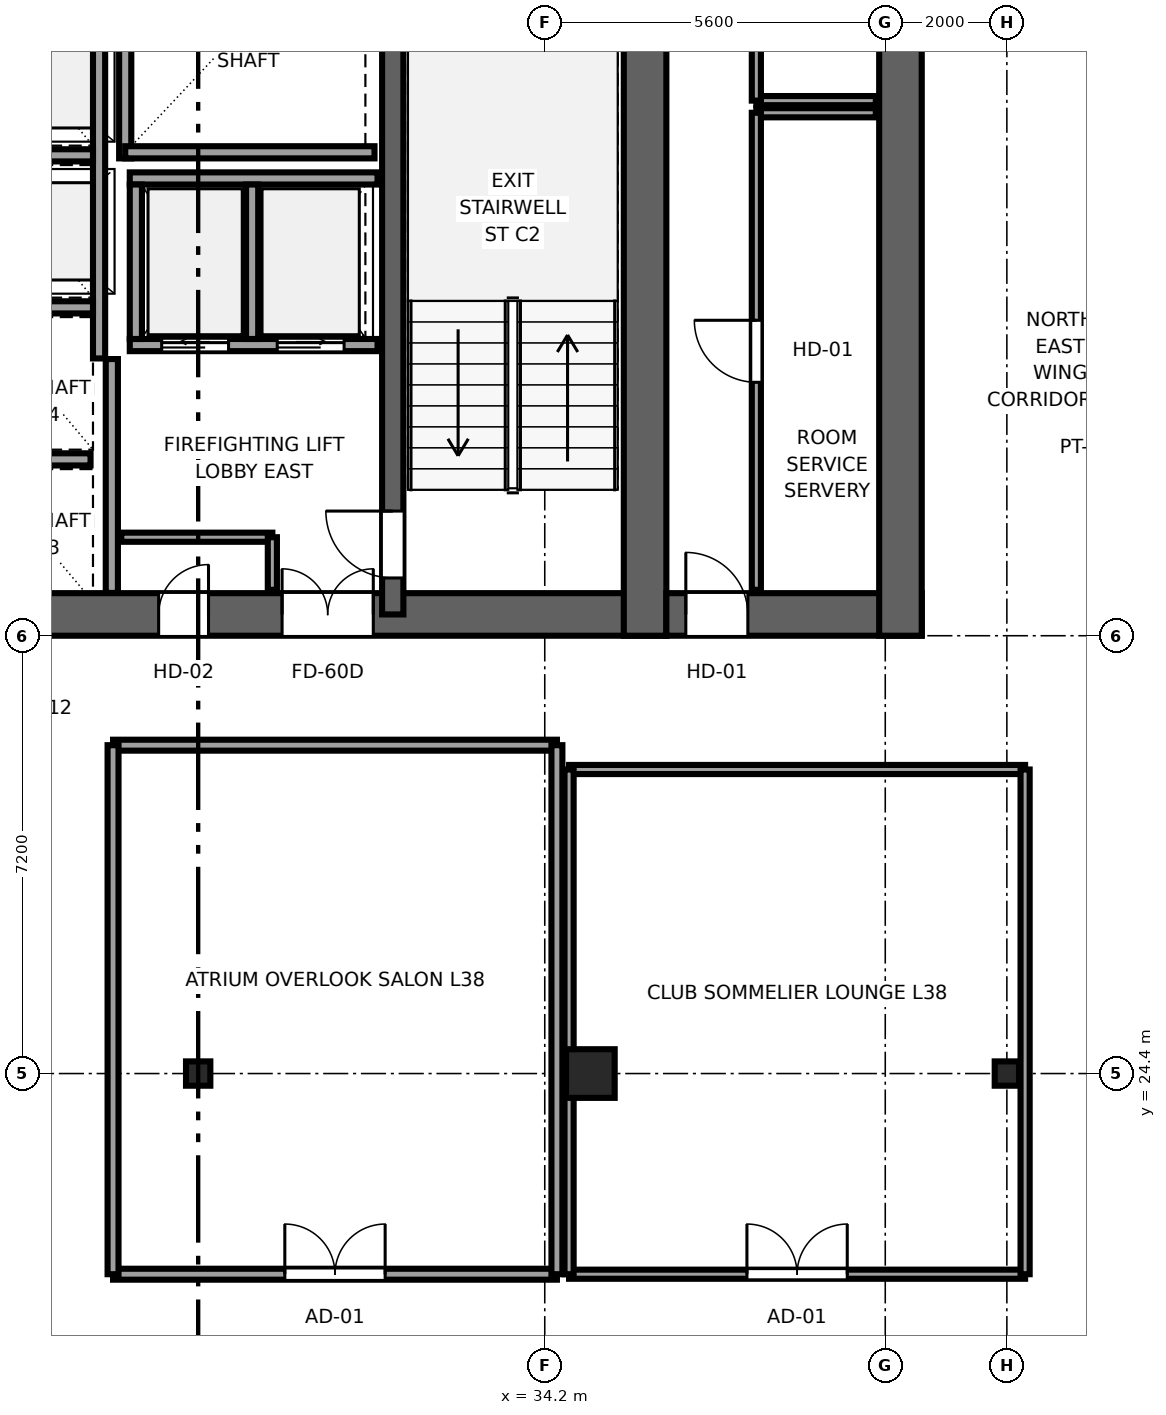
"""IFC4 building model, lengths in metres.
Left out: names, types, materials, properties, quantities, classifications, styles, units other than length and angle.
Written with IfcOpenShell. Run it as: python <this file> out.ifc"""

import sys

from ifc_helpers import new_model, si_unit, direction, frame, frame_2d, origin, origin_2d, place, context, subcontext, project, spatial, rectangle, i_section, extrude, source, transform, mapped, element, fill, save


model = new_model("IFC4")
c1 = context("Model", 3, precision=1e-05, world=origin(), true_north=direction((0.0, 1.0)))
c2 = subcontext(c1, "Body", "Model", "MODEL_VIEW")
j1 = project(units=[si_unit("LENGTHUNIT", "METRE"), si_unit("PLANEANGLEUNIT", "RADIAN")], contexts=[c1])
p1 = place(None, origin())
s1 = spatial("IfcSite", under=j1, at=p1, CompositionType="ELEMENT")
p2 = place(p1, origin())
s2 = spatial("IfcBuilding", under=s1, at=p2, CompositionType="ELEMENT")
p3 = place(p2, frame((0.0, 0.0, 147.05)))
s3 = spatial("IfcBuildingStorey", under=s2, at=p3, CompositionType="ELEMENT", Elevation=147.05)
p4 = place(p3, frame((9.8, 31.95, 0.0), z_axis=(0.0, 0.0, 1.0), x_axis=(1.0, 0.0, 0.0)))
e1 = element("IfcWall", 1, at=p4, inside=s3, PredefinedType="SHEAR", context=c2, shape_type="SweptSolid", body=[
    extrude(rectangle(XDim=26.4, YDim=0.7, at=frame_2d((13.2, 0.0))), origin(), (0.0, 0.0, 1.0), 3.55),
])
p5 = place(p4, frame((6.32, 0.0, 0.0), z_axis=(0.0, 0.0, 1.0), x_axis=(-1.0, 0.0, 0.0)))
e2 = element("IfcOpeningElement", 2, at=p5, cuts=e1, PredefinedType="OPENING", context=c2, shape_type="SweptSolid", body=[
    extrude(rectangle(XDim=1.5, YDim=2.04, at=frame_2d((0.75, 1.02))), frame((0.0, 0.36, 0.0), z_axis=(0.0, -1.0, 0.0), x_axis=(1.0, 0.0, 0.0)), (0.0, 0.0, 1.0), 0.72),
])
p6 = place(p4, frame((13.95, 0.0, 0.0), z_axis=(0.0, 0.0, 1.0), x_axis=(-1.0, 0.0, 0.0)))
e3 = element("IfcOpeningElement", 3, at=p6, cuts=e1, PredefinedType="OPENING", context=c2, shape_type="SweptSolid", body=[
    extrude(rectangle(XDim=1.5, YDim=2.04, at=frame_2d((0.75, 1.02))), frame((0.0, 0.36, 0.0), z_axis=(0.0, -1.0, 0.0), x_axis=(1.0, 0.0, 0.0)), (0.0, 0.0, 1.0), 0.72),
])
p7 = place(p4, frame((21.58, 0.0, 0.0), z_axis=(0.0, 0.0, 1.0), x_axis=(-1.0, 0.0, 0.0)))
e4 = element("IfcOpeningElement", 4, at=p7, cuts=e1, PredefinedType="OPENING", context=c2, shape_type="SweptSolid", body=[
    extrude(rectangle(XDim=1.5, YDim=2.04, at=frame_2d((0.75, 1.02))), frame((0.0, 0.36, 0.0), z_axis=(0.0, -1.0, 0.0), x_axis=(1.0, 0.0, 0.0)), (0.0, 0.0, 1.0), 0.72),
])
p8 = place(p4, frame((8.37, 0.0, 0.0), z_axis=(0.0, 0.0, 1.0), x_axis=(-1.0, 0.0, 0.0)))
e5 = element("IfcOpeningElement", 5, at=p8, cuts=e1, PredefinedType="OPENING", context=c2, shape_type="SweptSolid", body=[
    extrude(rectangle(XDim=0.82, YDim=2.01, at=frame_2d((0.41, 1.005))), frame((0.0, 0.36, 0.0), z_axis=(0.0, -1.0, 0.0), x_axis=(1.0, 0.0, 0.0)), (0.0, 0.0, 1.0), 0.72),
])
p9 = place(p4, frame((18.87, 0.0, 0.0), z_axis=(0.0, 0.0, 1.0), x_axis=(-1.0, 0.0, 0.0)))
e6 = element("IfcOpeningElement", 6, at=p9, cuts=e1, PredefinedType="OPENING", context=c2, shape_type="SweptSolid", body=[
    extrude(rectangle(XDim=0.82, YDim=2.01, at=frame_2d((0.41, 1.005))), frame((0.0, 0.36, 0.0), z_axis=(0.0, -1.0, 0.0), x_axis=(1.0, 0.0, 0.0)), (0.0, 0.0, 1.0), 0.72),
])
p10 = place(p3, frame((35.85, 31.6, 0.0), z_axis=(0.0, 0.0, 1.0), x_axis=(0.0, 1.0, 0.0)))
e7 = element("IfcWall", 7, at=p10, inside=s3, PredefinedType="SHEAR", context=c2, shape_type="SweptSolid", body=[
    extrude(rectangle(XDim=13.6, YDim=0.7, at=frame_2d((6.8, 0.0))), origin(), (0.0, 0.0, 1.0), 3.55),
])
p11 = place(p3, frame((31.7, 31.95, 0.0), z_axis=(0.0, 0.0, 1.0), x_axis=(0.0, 1.0, 0.0)))
e8 = element("IfcWall", 8, at=p11, inside=s3, PredefinedType="SHEAR", context=c2, shape_type="SweptSolid", body=[
    extrude(rectangle(XDim=12.9, YDim=0.35, at=frame_2d((6.45, 0.0))), origin(), (0.0, 0.0, 1.0), 3.55),
])
p12 = place(p11, frame((1.7, 0.0, 0.0), z_axis=(0.0, 0.0, 1.0), x_axis=(-1.0, 0.0, 0.0)))
e9 = element("IfcOpeningElement", 9, at=p12, cuts=e8, PredefinedType="OPENING", context=c2, shape_type="SweptSolid", body=[
    extrude(rectangle(XDim=1.1, YDim=2.12, at=frame_2d((0.55, 1.06))), frame((0.0, 0.185, 0.0), z_axis=(0.0, -1.0, 0.0), x_axis=(1.0, 0.0, 0.0)), (0.0, 0.0, 1.0), 0.37),
])
p13 = place(p3, frame((36.2, 31.95, 0.0), z_axis=(0.0, 0.0, 1.0), x_axis=(1.0, 0.0, 0.0)))
e10 = element("IfcWall", 10, at=p13, inside=s3, PredefinedType="SHEAR", context=c2, shape_type="SweptSolid", body=[
    extrude(rectangle(XDim=4.2, YDim=0.7, at=frame_2d((2.1, 0.0))), origin(), (0.0, 0.0, 1.0), 3.55),
])
p14 = place(p13, frame((1.34, 0.0, 0.0), z_axis=(0.0, 0.0, 1.0), x_axis=(-1.0, 0.0, 0.0)))
e11 = element("IfcOpeningElement", 11, at=p14, cuts=e10, PredefinedType="OPENING", context=c2, shape_type="SweptSolid", body=[
    extrude(rectangle(XDim=1.02, YDim=2.03, at=frame_2d((0.51, 1.015))), frame((0.0, 0.36, 0.0), z_axis=(0.0, -1.0, 0.0), x_axis=(1.0, 0.0, 0.0)), (0.0, 0.0, 1.0), 0.72),
])
p15 = place(p3, frame((40.05, 31.6, 0.0), z_axis=(0.0, 0.0, 1.0), x_axis=(0.0, 1.0, 0.0)))
e12 = element("IfcWall", 12, at=p15, inside=s3, PredefinedType="SHEAR", context=c2, shape_type="SweptSolid", body=[
    extrude(rectangle(XDim=13.6, YDim=0.7, at=frame_2d((6.8, 0.0))), origin(), (0.0, 0.0, 1.0), 3.55),
])
m1 = source(origin(), c2, "Body", "SweptSolid", [
    extrude(rectangle(XDim=0.8, YDim=0.8, at=origin_2d()), origin(), (0.0, 0.0, 1.0), 3.55),
])
p16 = place(p3, frame((34.95, 24.4, 0.0), z_axis=(0.0, 0.0, 1.0), x_axis=(1.0, 0.0, 0.0)))
e13 = element("IfcColumn", 13, at=p16, inside=s3, PredefinedType="COLUMN", context=c2, shape_type="MappedRepresentation", body=[
    mapped(m1, transform((0.0, 0.0, 0.0), x_axis=(1.0, 0.0, 0.0), y_axis=(0.0, 1.0, 0.0), z_axis=(0.0, 0.0, 1.0), scale=1.0)),
])
m2 = source(origin(), c2, "Body", "SweptSolid", [
    extrude(i_section(OverallWidth=0.4, OverallDepth=0.4, WebThickness=0.02, FlangeThickness=0.035, at=origin_2d()), origin(), (0.0, 0.0, 1.0), 3.55),
])
for number, where, z_axis, x_axis in (
    (14, (41.8, 24.4, 0.0), (0.0, 0.0, 1.0), (1.0, 0.0, 0.0)),
    (15, (28.5, 24.4, 0.0), (0.0, 0.0, 1.0), (1.0, 0.0, 0.0)),
):
    element("IfcColumn", number, at=place(p3, frame(where, z_axis=z_axis, x_axis=x_axis)), inside=s3, PredefinedType="COLUMN", context=c2, shape_type="MappedRepresentation", body=[
        mapped(m2, transform((0.0, 0.0, 0.0), x_axis=(1.0, 0.0, 0.0), y_axis=(0.0, 1.0, 0.0), z_axis=(0.0, 0.0, 1.0), scale=1.0)),
    ])
p17 = place(p3, frame((27.3, 39.45, 0.0), z_axis=(0.0, 0.0, 1.0), x_axis=(0.0, 1.0, 0.0)))
e16 = element("IfcWall", 16, at=p17, inside=s3, PredefinedType="SOLIDWALL", context=c2, shape_type="SweptSolid", body=[
    extrude(rectangle(XDim=4.4, YDim=0.2, at=frame_2d((2.2, 0.0))), origin(), (0.0, 0.0, 1.0), 3.37),
])
p18 = place(p3, frame((27.3, 39.55, 0.0), z_axis=(0.0, 0.0, 1.0), x_axis=(1.0, 0.0, 0.0)))
e17 = element("IfcWall", 17, at=p18, inside=s3, PredefinedType="SOLIDWALL", context=c2, shape_type="SweptSolid", body=[
    extrude(rectangle(XDim=4.1, YDim=0.2, at=frame_2d((2.05, 0.0))), origin(), (0.0, 0.0, 1.0), 3.37),
])
p19 = place(p3, frame((27.08, 32.304, 0.0), z_axis=(0.0, 0.0, 1.0), x_axis=(0.0, 1.0, 0.0)))
e18 = element("IfcWall", 18, at=p19, inside=s3, PredefinedType="SOLIDWALL", context=c2, shape_type="SweptSolid", body=[
    extrude(rectangle(XDim=3.846, YDim=0.2, at=frame_2d((1.923, 0.0))), origin(), (0.0, 0.0, 1.0), 3.37),
])
p20 = place(p3, frame((27.375, 36.38, 0.0), z_axis=(0.0, 0.0, 1.0), x_axis=(1.0, 0.0, 0.0)))
e19 = element("IfcWall", 19, at=p20, inside=s3, PredefinedType="SOLIDWALL", context=c2, shape_type="SweptSolid", body=[
    extrude(rectangle(XDim=4.075, YDim=0.2, at=frame_2d((2.038, 0.0))), origin(), (0.0, 0.0, 1.0), 3.37),
])
p21 = place(p20, frame((0.525, 0.0, 0.0)))
e20 = element("IfcOpeningElement", 20, at=p21, cuts=e19, PredefinedType="OPENING", context=c2, shape_type="SweptSolid", body=[
    extrude(rectangle(XDim=1.1, YDim=2.12, at=frame_2d((0.55, 1.06))), frame((0.0, 0.11, 0.0), z_axis=(0.0, -1.0, 0.0), x_axis=(1.0, 0.0, 0.0)), (0.0, 0.0, 1.0), 0.22),
])
p22 = place(p20, frame((2.425, 0.0, 0.0)))
e21 = element("IfcOpeningElement", 21, at=p22, cuts=e19, PredefinedType="OPENING", context=c2, shape_type="SweptSolid", body=[
    extrude(rectangle(XDim=1.1, YDim=2.12, at=frame_2d((0.55, 1.06))), frame((0.0, 0.11, 0.0), z_axis=(0.0, -1.0, 0.0), x_axis=(1.0, 0.0, 0.0)), (0.0, 0.0, 1.0), 0.22),
])
p23 = place(p3, frame((27.375, 39.12, 0.0), z_axis=(0.0, 0.0, 1.0), x_axis=(1.0, 0.0, 0.0)))
e22 = element("IfcWall", 22, at=p23, inside=s3, PredefinedType="SOLIDWALL", context=c2, shape_type="SweptSolid", body=[
    extrude(rectangle(XDim=4.075, YDim=0.2, at=frame_2d((2.038, 0.0))), origin(), (0.0, 0.0, 1.0), 3.37),
])
for number, where, z_axis, x_axis in (
    (23, (27.475, 36.48, 0.0), (0.0, 0.0, 1.0), (0.0, 1.0, 0.0)),
    (24, (29.387, 36.48, 0.0), (0.0, 0.0, 1.0), (0.0, 1.0, 0.0)),
):
    element("IfcWall", number, at=place(p3, frame(where, z_axis=z_axis, x_axis=x_axis)), inside=s3, PredefinedType="SOLIDWALL", context=c2, shape_type="SweptSolid", body=[
        extrude(rectangle(XDim=2.54, YDim=0.2, at=frame_2d((1.27, 0.0))), origin(), (0.0, 0.0, 1.0), 3.37),
    ])
p24 = place(p3, frame((26.87, 36.16, 0.0), z_axis=(0.0, 0.0, 1.0), x_axis=(0.0, 1.0, 0.0)))
e25 = element("IfcWall", 25, at=p24, inside=s3, PredefinedType="SOLIDWALL", context=c2, shape_type="SweptSolid", body=[
    extrude(rectangle(XDim=8.336, YDim=0.2, at=frame_2d((4.168, 0.0))), origin(), (0.0, 0.0, 1.0), 3.37),
])
p25 = place(p3, frame((24.93, 34.5, 0.0), z_axis=(0.0, 0.0, 1.0), x_axis=(1.0, 0.0, 0.0)))
e26 = element("IfcWall", 26, at=p25, inside=s3, PredefinedType="SOLIDWALL", context=c2, shape_type="SweptSolid", body=[
    extrude(rectangle(XDim=1.8, YDim=0.2, at=frame_2d((0.9, 0.0))), origin(), (0.0, 0.0, 1.0), 3.37),
])
for number, where, z_axis, x_axis in (
    (27, (24.93, 37.0, 0.0), (0.0, 0.0, 1.0), (1.0, 0.0, 0.0)),
    (28, (24.93, 39.5, 0.0), (0.0, 0.0, 1.0), (1.0, 0.0, 0.0)),
):
    element("IfcWall", number, at=place(p3, frame(where, z_axis=z_axis, x_axis=x_axis)), inside=s3, PredefinedType="SOLIDWALL", context=c2, shape_type="SweptSolid", body=[
        extrude(rectangle(XDim=1.84, YDim=0.2, at=frame_2d((0.92, 0.0))), origin(), (0.0, 0.0, 1.0), 3.37),
    ])
p26 = place(p3, frame((27.235, 33.22, 0.0), z_axis=(0.0, 0.0, 1.0), x_axis=(1.0, 0.0, 0.0)))
e29 = element("IfcWall", 29, at=p26, inside=s3, PredefinedType="PARTITIONING", context=c2, shape_type="SweptSolid", body=[
    extrude(rectangle(XDim=2.485, YDim=0.15, at=frame_2d((1.242, 0.0))), origin(), (0.0, 0.0, 1.0), 3.37),
])
p27 = place(p3, frame((29.72, 32.355, 0.0), z_axis=(0.0, 0.0, 1.0), x_axis=(0.0, 1.0, 0.0)))
e30 = element("IfcWall", 30, at=p27, inside=s3, PredefinedType="PARTITIONING", context=c2, shape_type="SweptSolid", body=[
    extrude(rectangle(XDim=0.865, YDim=0.15, at=frame_2d((0.433, 0.0))), origin(), (0.0, 0.0, 1.0), 3.37),
])
p28 = place(p3, frame((37.68, 40.2, 0.0), z_axis=(0.0, 0.0, 1.0), x_axis=(1.0, 0.0, 0.0)))
e31 = element("IfcWall", 31, at=p28, inside=s3, PredefinedType="PARTITIONING", context=c2, shape_type="SweptSolid", body=[
    extrude(rectangle(XDim=1.965, YDim=0.15, at=frame_2d((0.982, 0.0))), origin(), (0.0, 0.0, 1.0), 3.37),
])
p29 = place(p3, frame((37.68, 32.355, 0.0), z_axis=(0.0, 0.0, 1.0), x_axis=(0.0, 1.0, 0.0)))
e32 = element("IfcWall", 32, at=p29, inside=s3, PredefinedType="PARTITIONING", context=c2, shape_type="SweptSolid", body=[
    extrude(rectangle(XDim=7.845, YDim=0.15, at=frame_2d((3.922, 0.0))), origin(), (0.0, 0.0, 1.0), 3.37),
])
p30 = place(p29, frame((3.413, 0.0, 0.0)))
e33 = element("IfcOpeningElement", 33, at=p30, cuts=e32, PredefinedType="OPENING", context=c2, shape_type="SweptSolid", body=[
    extrude(rectangle(XDim=1.02, YDim=2.03, at=frame_2d((0.51, 1.015))), frame((0.0, 0.085, 0.0), z_axis=(0.0, -1.0, 0.0), x_axis=(1.0, 0.0, 0.0)), (0.0, 0.0, 1.0), 0.17),
])
p31 = place(p3, frame((37.68, 40.4, 0.0), z_axis=(0.0, 0.0, 1.0), x_axis=(1.0, 0.0, 0.0)))
e34 = element("IfcWall", 34, at=p31, inside=s3, PredefinedType="PARTITIONING", context=c2, shape_type="SweptSolid", body=[
    extrude(rectangle(XDim=1.965, YDim=0.15, at=frame_2d((0.982, 0.0))), origin(), (0.0, 0.0, 1.0), 3.37),
])
p32 = place(p3, frame((37.68, 40.4, 0.0), z_axis=(0.0, 0.0, 1.0), x_axis=(0.0, 1.0, 0.0)))
e35 = element("IfcWall", 35, at=p32, inside=s3, PredefinedType="PARTITIONING", context=c2, shape_type="SweptSolid", body=[
    extrude(rectangle(XDim=3.2, YDim=0.15, at=frame_2d((1.6, 0.0))), origin(), (0.0, 0.0, 1.0), 3.37),
])
p33 = place(p32, frame((1.19, 0.0, 0.0)))
e36 = element("IfcOpeningElement", 36, at=p33, cuts=e35, PredefinedType="OPENING", context=c2, shape_type="SweptSolid", body=[
    extrude(rectangle(XDim=0.82, YDim=2.01, at=frame_2d((0.41, 1.005))), frame((0.0, 0.085, 0.0), z_axis=(0.0, -1.0, 0.0), x_axis=(1.0, 0.0, 0.0)), (0.0, 0.0, 1.0), 0.17),
])
p34 = place(p3, frame((27.1, 21.1, 0.0), z_axis=(0.0, 0.0, 1.0), x_axis=(1.0, 0.0, 0.0)))
e37 = element("IfcWall", 37, at=p34, inside=s3, PredefinedType="PARTITIONING", context=c2, shape_type="SweptSolid", body=[
    extrude(rectangle(XDim=7.3, YDim=0.18, at=frame_2d((3.65, 0.0))), origin(), (0.0, 0.0, 1.0), 3.37),
])
p35 = place(p34, frame((2.825, 0.0, 0.0)))
e38 = element("IfcOpeningElement", 38, at=p35, cuts=e37, PredefinedType="OPENING", context=c2, shape_type="SweptSolid", body=[
    extrude(rectangle(XDim=1.65, YDim=2.15, at=frame_2d((0.825, 1.075))), frame((0.0, 0.1, 0.0), z_axis=(0.0, -1.0, 0.0), x_axis=(1.0, 0.0, 0.0)), (0.0, 0.0, 1.0), 0.2),
])
p36 = place(p3, frame((27.1, 29.8, 0.0), z_axis=(0.0, 0.0, 1.0), x_axis=(1.0, 0.0, 0.0)))
e39 = element("IfcWall", 39, at=p36, inside=s3, PredefinedType="PARTITIONING", context=c2, shape_type="SweptSolid", body=[
    extrude(rectangle(XDim=7.3, YDim=0.18, at=frame_2d((3.65, 0.0))), origin(), (0.0, 0.0, 1.0), 3.37),
])
for number, where, z_axis, x_axis in (
    (40, (27.1, 21.1, 0.0), (0.0, 0.0, 1.0), (0.0, 1.0, 0.0)),
    (41, (34.4, 21.1, 0.0), (0.0, 0.0, 1.0), (0.0, 1.0, 0.0)),
):
    element("IfcWall", number, at=place(p3, frame(where, z_axis=z_axis, x_axis=x_axis)), inside=s3, PredefinedType="PARTITIONING", context=c2, shape_type="SweptSolid", body=[
        extrude(rectangle(XDim=8.7, YDim=0.18, at=frame_2d((4.35, 0.0))), origin(), (0.0, 0.0, 1.0), 3.37),
    ])
p37 = place(p3, frame((34.6, 21.1, 0.0), z_axis=(0.0, 0.0, 1.0), x_axis=(1.0, 0.0, 0.0)))
e42 = element("IfcWall", 42, at=p37, inside=s3, PredefinedType="PARTITIONING", context=c2, shape_type="SweptSolid", body=[
    extrude(rectangle(XDim=7.5, YDim=0.15, at=frame_2d((3.75, 0.0))), origin(), (0.0, 0.0, 1.0), 3.37),
])
p38 = place(p37, frame((2.925, 0.0, 0.0)))
e43 = element("IfcOpeningElement", 43, at=p38, cuts=e42, PredefinedType="OPENING", context=c2, shape_type="SweptSolid", body=[
    extrude(rectangle(XDim=1.65, YDim=2.15, at=frame_2d((0.825, 1.075))), frame((0.0, 0.085, 0.0), z_axis=(0.0, -1.0, 0.0), x_axis=(1.0, 0.0, 0.0)), (0.0, 0.0, 1.0), 0.17),
])
p39 = place(p3, frame((34.6, 29.4, 0.0), z_axis=(0.0, 0.0, 1.0), x_axis=(1.0, 0.0, 0.0)))
e44 = element("IfcWall", 44, at=p39, inside=s3, PredefinedType="PARTITIONING", context=c2, shape_type="SweptSolid", body=[
    extrude(rectangle(XDim=7.5, YDim=0.15, at=frame_2d((3.75, 0.0))), origin(), (0.0, 0.0, 1.0), 2.16),
])
p40 = place(p3, frame((34.6, 21.1, 0.0), z_axis=(0.0, 0.0, 1.0), x_axis=(0.0, 1.0, 0.0)))
e45 = element("IfcWall", 45, at=p40, inside=s3, PredefinedType="PARTITIONING", context=c2, shape_type="SweptSolid", body=[
    extrude(rectangle(XDim=8.3, YDim=0.15, at=frame_2d((4.15, 0.0))), origin(), (0.0, 0.0, 1.0), 3.37),
])
p41 = place(p3, frame((42.1, 21.1, 0.0), z_axis=(0.0, 0.0, 1.0), x_axis=(0.0, 1.0, 0.0)))
e46 = element("IfcWall", 46, at=p41, inside=s3, PredefinedType="PARTITIONING", context=c2, shape_type="SweptSolid", body=[
    extrude(rectangle(XDim=8.3, YDim=0.15, at=frame_2d((4.15, 0.0))), origin(), (0.0, 0.0, 1.0), 2.16),
])
m3 = source(origin(), c2, "Body", "SweptSolid", [
    extrude(rectangle(XDim=1.1, YDim=2.12, at=frame_2d((0.55, 1.06))), frame((0.0, 0.025, 0.0), z_axis=(0.0, -1.0, 0.0), x_axis=(1.0, 0.0, 0.0)), (0.0, 0.0, 1.0), 0.05),
])
p42 = place(p12, origin())
e47 = element("IfcDoor", 47, at=p42, inside=s3, OperationType="SINGLE_SWING_RIGHT", PredefinedType="DOOR", context=c2, shape_type="MappedRepresentation", body=[
    mapped(m3, transform((0.0, 0.0, 0.0), x_axis=(1.0, 0.0, 0.0), y_axis=(0.0, 1.0, 0.0), z_axis=(0.0, 0.0, 1.0), scale=1.0)),
])
fill(e9, e47)
m4 = source(origin(), c2, "Body", "SweptSolid", [
    extrude(rectangle(XDim=1.5, YDim=2.04, at=frame_2d((0.75, 1.02))), frame((0.0, 0.025, 0.0), z_axis=(0.0, -1.0, 0.0), x_axis=(1.0, 0.0, 0.0)), (0.0, 0.0, 1.0), 0.05),
])
p43 = place(p7, origin())
e48 = element("IfcDoor", 48, at=p43, inside=s3, OperationType="DOUBLE_DOOR_SINGLE_SWING", PredefinedType="DOOR", context=c2, shape_type="MappedRepresentation", body=[
    mapped(m4, transform((0.0, 0.0, 0.0), x_axis=(1.0, 0.0, 0.0), y_axis=(0.0, 1.0, 0.0), z_axis=(0.0, 0.0, 1.0), scale=1.0)),
])
fill(e4, e48)
m5 = source(origin(), c2, "Body", "SweptSolid", [
    extrude(rectangle(XDim=0.82, YDim=2.01, at=frame_2d((0.41, 1.005))), frame((0.0, 0.025, 0.0), z_axis=(0.0, -1.0, 0.0), x_axis=(1.0, 0.0, 0.0)), (0.0, 0.0, 1.0), 0.05),
])
p44 = place(p9, origin())
e49 = element("IfcDoor", 49, at=p44, inside=s3, OperationType="SINGLE_SWING_RIGHT", PredefinedType="DOOR", context=c2, shape_type="MappedRepresentation", body=[
    mapped(m5, transform((0.0, 0.0, 0.0), x_axis=(1.0, 0.0, 0.0), y_axis=(0.0, 1.0, 0.0), z_axis=(0.0, 0.0, 1.0), scale=1.0)),
])
fill(e6, e49)
m6 = source(origin(), c2, "Body", "SweptSolid", [
    extrude(rectangle(XDim=1.02, YDim=2.03, at=frame_2d((0.51, 1.015))), frame((0.0, 0.025, 0.0), z_axis=(0.0, -1.0, 0.0), x_axis=(1.0, 0.0, 0.0)), (0.0, 0.0, 1.0), 0.05),
])
p45 = place(p14, origin())
e50 = element("IfcDoor", 50, at=p45, inside=s3, OperationType="SINGLE_SWING_LEFT", PredefinedType="DOOR", context=c2, shape_type="MappedRepresentation", body=[
    mapped(m6, transform((0.0, 0.0, 0.0), x_axis=(1.0, 0.0, 0.0), y_axis=(0.0, 1.0, 0.0), z_axis=(0.0, 0.0, 1.0), scale=1.0)),
])
fill(e11, e50)
m7 = source(origin(), c2, "Body", "SweptSolid", [
    extrude(rectangle(XDim=1.1, YDim=2.12, at=frame_2d((0.55, 1.06))), frame((0.0, 0.025, 0.0), z_axis=(0.0, -1.0, 0.0), x_axis=(1.0, 0.0, 0.0)), (0.0, 0.0, 1.0), 0.05),
])
p46 = place(p21, origin())
e51 = element("IfcDoor", 51, at=p46, inside=s3, OperationType="SLIDING_TO_LEFT", PredefinedType="DOOR", context=c2, shape_type="MappedRepresentation", body=[
    mapped(m7, transform((0.0, 0.0, 0.0), x_axis=(1.0, 0.0, 0.0), y_axis=(0.0, 1.0, 0.0), z_axis=(0.0, 0.0, 1.0), scale=1.0)),
])
fill(e20, e51)
p47 = place(p22, origin())
e52 = element("IfcDoor", 52, at=p47, inside=s3, OperationType="SLIDING_TO_RIGHT", PredefinedType="DOOR", context=c2, shape_type="MappedRepresentation", body=[
    mapped(m7, transform((0.0, 0.0, 0.0), x_axis=(1.0, 0.0, 0.0), y_axis=(0.0, 1.0, 0.0), z_axis=(0.0, 0.0, 1.0), scale=1.0)),
])
fill(e21, e52)
p48 = place(p30, origin())
e53 = element("IfcDoor", 53, at=p48, inside=s3, OperationType="SINGLE_SWING_RIGHT", PredefinedType="DOOR", context=c2, shape_type="MappedRepresentation", body=[
    mapped(m6, transform((0.0, 0.0, 0.0), x_axis=(1.0, 0.0, 0.0), y_axis=(0.0, 1.0, 0.0), z_axis=(0.0, 0.0, 1.0), scale=1.0)),
])
fill(e33, e53)
m8 = source(origin(), c2, "Body", "SweptSolid", [
    extrude(rectangle(XDim=1.65, YDim=2.15, at=frame_2d((0.825, 1.075))), frame((0.0, 0.025, 0.0), z_axis=(0.0, -1.0, 0.0), x_axis=(1.0, 0.0, 0.0)), (0.0, 0.0, 1.0), 0.05),
])
p49 = place(p35, origin())
e54 = element("IfcDoor", 54, at=p49, inside=s3, OperationType="DOUBLE_DOOR_SINGLE_SWING", PredefinedType="DOOR", context=c2, shape_type="MappedRepresentation", body=[
    mapped(m8, transform((0.0, 0.0, 0.0), x_axis=(1.0, 0.0, 0.0), y_axis=(0.0, 1.0, 0.0), z_axis=(0.0, 0.0, 1.0), scale=1.0)),
])
fill(e38, e54)
p50 = place(p38, origin())
e55 = element("IfcDoor", 55, at=p50, inside=s3, OperationType="DOUBLE_DOOR_SINGLE_SWING", PredefinedType="DOOR", context=c2, shape_type="MappedRepresentation", body=[
    mapped(m8, transform((0.0, 0.0, 0.0), x_axis=(1.0, 0.0, 0.0), y_axis=(0.0, 1.0, 0.0), z_axis=(0.0, 0.0, 1.0), scale=1.0)),
])
fill(e43, e55)
save(model, sys.argv[1])
